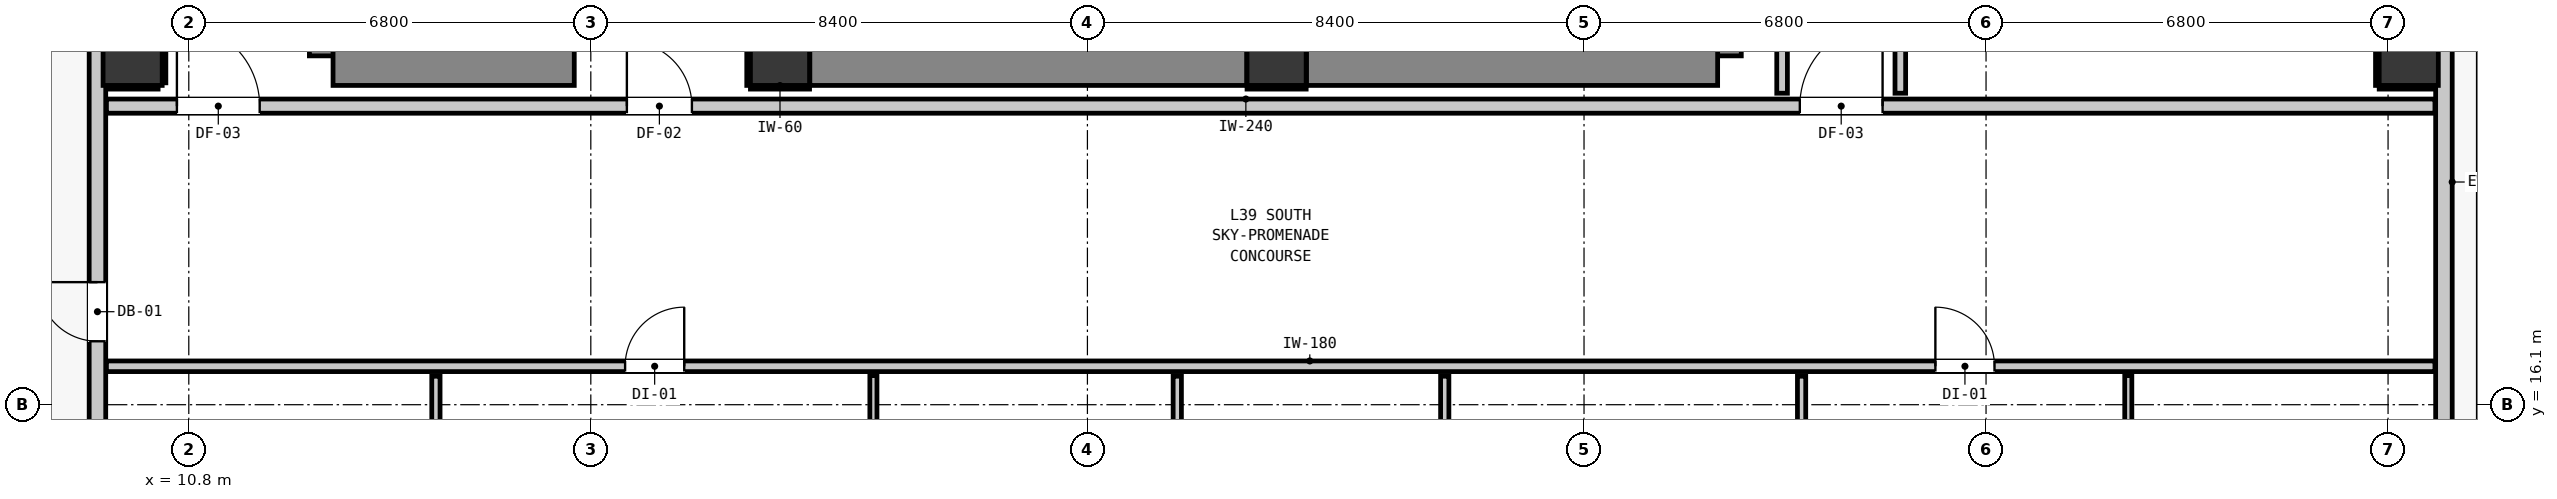
"""IFC4 building model, lengths in metres.
Left out: names, types, materials, properties, quantities, classifications, styles, units other than length and angle.
Written with IfcOpenShell. Run it as: python <this file> out.ifc"""

import sys

from ifc_helpers import new_model, si_unit, direction, frame, frame_2d, origin, origin_2d, place, context, subcontext, project, spatial, rectangle, extrude, element, fill, save


model = new_model("IFC4")
c1 = context("Model", 3, precision=1e-05, world=origin(), true_north=direction((0.0, 1.0)))
c2 = subcontext(c1, "Body", "Model", "MODEL_VIEW")
j1 = project(units=[si_unit("LENGTHUNIT", "METRE"), si_unit("PLANEANGLEUNIT", "RADIAN")], contexts=[c1])
p1 = place(None, origin())
s1 = spatial("IfcSite", under=j1, at=p1, CompositionType="ELEMENT")
p2 = place(p1, origin())
s2 = spatial("IfcBuilding", under=s1, at=p2, CompositionType="ELEMENT")
p3 = place(p2, frame((0.0, 0.0, 135.96)))
s3 = spatial("IfcBuildingStorey", under=s2, at=p3, CompositionType="ELEMENT", Elevation=135.96)
for number, where, z_axis, x_axis in (
    (1, (20.8, 22.0, 0.0), (0.0, 0.0, 1.0), (1.0, 0.0, 0.0)),
    (2, (29.2, 22.0, 0.0), (0.0, 0.0, 1.0), (1.0, 0.0, 0.0)),
):
    element("IfcColumn", number, at=place(p3, frame(where, z_axis=z_axis, x_axis=x_axis)), inside=s3, PredefinedType="COLUMN", context=c2, shape_type="SweptSolid", body=[
        extrude(rectangle(XDim=1.0, YDim=1.0, at=origin_2d()), origin(), (0.0, 0.0, 1.0), 3.32),
    ])
p4 = place(p3, frame((13.34, 22.0, 0.0), z_axis=(0.0, 0.0, 1.0), x_axis=(0.0, 1.0, 0.0)))
e3 = element("IfcWall", 3, at=p4, inside=s3, PredefinedType="SHEAR", context=c2, shape_type="SweptSolid", body=[
    extrude(rectangle(XDim=8.195, YDim=1.0, at=frame_2d((4.098, 0.0))), origin(), (0.0, 0.0, 1.0), 3.32),
])
p5 = place(p3, frame((13.24, 22.0, 0.0), z_axis=(0.0, 0.0, 1.0), x_axis=(1.0, 0.0, 0.0)))
e4 = element("IfcWall", 4, at=p5, inside=s3, PredefinedType="SHEAR", context=c2, shape_type="SweptSolid", body=[
    extrude(rectangle(XDim=4.08, YDim=1.0, at=frame_2d((2.04, 0.0))), origin(), (0.0, 0.0, 1.0), 3.32),
])
p6 = place(p3, frame((36.56, 22.0, 0.0), z_axis=(0.0, 0.0, 1.0), x_axis=(0.0, 1.0, 0.0)))
e5 = element("IfcWall", 5, at=p6, inside=s3, PredefinedType="SHEAR", context=c2, shape_type="SweptSolid", body=[
    extrude(rectangle(XDim=8.195, YDim=1.0, at=frame_2d((4.098, 0.0))), origin(), (0.0, 0.0, 1.0), 3.32),
])
p7 = place(p3, frame((29.705, 22.0, 0.0), z_axis=(0.0, 0.0, 1.0), x_axis=(1.0, 0.0, 0.0)))
e6 = element("IfcWall", 6, at=p7, inside=s3, PredefinedType="SHEAR", context=c2, shape_type="SweptSolid", body=[
    extrude(rectangle(XDim=6.955, YDim=1.0, at=frame_2d((3.478, 0.0))), origin(), (0.0, 0.0, 1.0), 3.32),
])
p8 = place(p3, frame((21.305, 22.0, 0.0), z_axis=(0.0, 0.0, 1.0), x_axis=(1.0, 0.0, 0.0)))
e7 = element("IfcWall", 7, at=p8, inside=s3, PredefinedType="SHEAR", context=c2, shape_type="SweptSolid", body=[
    extrude(rectangle(XDim=7.39, YDim=1.0, at=frame_2d((3.695, 0.0))), origin(), (0.0, 0.0, 1.0), 3.32),
])
for number, where, z_axis, x_axis in (
    (8, (9.85, 22.0, 0.0), (0.0, 0.0, 1.0), (1.0, 0.0, 0.0)),
    (9, (48.35, 22.0, 0.0), (0.0, 0.0, 1.0), (1.0, 0.0, 0.0)),
):
    element("IfcColumn", number, at=place(p3, frame(where, z_axis=z_axis, x_axis=x_axis)), inside=s3, PredefinedType="COLUMN", context=c2, shape_type="SweptSolid", body=[
        extrude(rectangle(XDim=1.0, YDim=1.0, at=origin_2d()), origin(), (0.0, 0.0, 1.0), 3.32),
    ])
p9 = place(p3, frame((9.255, 11.355, 0.0), z_axis=(0.0, 0.0, 1.0), x_axis=(0.0, 1.0, 0.0)))
e10 = element("IfcWall", 10, at=p9, inside=s3, PredefinedType="STANDARD", context=c2, shape_type="SweptSolid", body=[
    extrude(rectangle(XDim=32.29, YDim=0.28, at=frame_2d((16.145, 0.0))), origin(), (0.0, 0.0, 1.0), 3.08),
])
p10 = place(p9, frame((5.818, 0.0, 0.0)))
e11 = element("IfcOpeningElement", 11, at=p10, cuts=e10, PredefinedType="OPENING", context=c2, shape_type="SweptSolid", body=[
    extrude(rectangle(XDim=1.0, YDim=2.15, at=frame_2d((0.5, 1.075))), frame((0.0, 0.15, 0.0), z_axis=(0.0, -1.0, 0.0), x_axis=(1.0, 0.0, 0.0)), (0.0, 0.0, 1.0), 0.3),
])
p11 = place(p9, frame((0.544, 0.0, 0.85)))
e12 = element("IfcOpeningElement", 12, at=p11, cuts=e10, PredefinedType="OPENING", context=c2, shape_type="SweptSolid", body=[
    extrude(rectangle(XDim=1.05, YDim=1.65, at=frame_2d((0.525, 0.825))), frame((0.0, 0.15, 0.0), z_axis=(0.0, -1.0, 0.0), x_axis=(1.0, 0.0, 0.0)), (0.0, 0.0, 1.0), 0.3),
])
p12 = place(p3, frame((48.945, 43.645, 0.0), z_axis=(0.0, 0.0, 1.0), x_axis=(0.0, -1.0, 0.0)))
e13 = element("IfcWall", 13, at=p12, inside=s3, PredefinedType="STANDARD", context=c2, shape_type="SweptSolid", body=[
    extrude(rectangle(XDim=32.29, YDim=0.28, at=frame_2d((16.145, 0.0))), origin(), (0.0, 0.0, 1.0), 3.08),
])
p13 = place(p12, frame((5.467, 0.0, 0.0)))
e14 = element("IfcOpeningElement", 14, at=p13, cuts=e13, PredefinedType="OPENING", context=c2, shape_type="SweptSolid", body=[
    extrude(rectangle(XDim=1.0, YDim=2.15, at=frame_2d((0.5, 1.075))), frame((0.0, 0.15, 0.0), z_axis=(0.0, -1.0, 0.0), x_axis=(1.0, 0.0, 0.0)), (0.0, 0.0, 1.0), 0.3),
])
p14 = place(p12, frame((30.696, 0.0, 0.85)))
e15 = element("IfcOpeningElement", 15, at=p14, cuts=e13, PredefinedType="OPENING", context=c2, shape_type="SweptSolid", body=[
    extrude(rectangle(XDim=1.05, YDim=1.65, at=frame_2d((0.525, 0.825))), frame((0.0, 0.15, 0.0), z_axis=(0.0, -1.0, 0.0), x_axis=(1.0, 0.0, 0.0)), (0.0, 0.0, 1.0), 0.3),
])
p15 = place(p12, frame((14.461, 0.0, 0.85)))
e16 = element("IfcOpeningElement", 16, at=p15, cuts=e13, PredefinedType="OPENING", context=c2, shape_type="SweptSolid", body=[
    extrude(rectangle(XDim=2.4, YDim=1.95, at=frame_2d((1.2, 0.975))), frame((0.0, 0.15, 0.0), z_axis=(0.0, -1.0, 0.0), x_axis=(1.0, 0.0, 0.0)), (0.0, 0.0, 1.0), 0.3),
])
p16 = place(p12, frame((7.106, 0.0, 0.85)))
e17 = element("IfcOpeningElement", 17, at=p16, cuts=e13, PredefinedType="OPENING", context=c2, shape_type="SweptSolid", body=[
    extrude(rectangle(XDim=1.05, YDim=1.65, at=frame_2d((0.525, 0.825))), frame((0.0, 0.15, 0.0), z_axis=(0.0, -1.0, 0.0), x_axis=(1.0, 0.0, 0.0)), (0.0, 0.0, 1.0), 0.3),
])
p17 = place(p3, frame((9.407, 21.15, 0.0), z_axis=(0.0, 0.0, 1.0), x_axis=(1.0, 0.0, 0.0)))
e18 = element("IfcWall", 18, at=p17, inside=s3, PredefinedType="PARTITIONING", context=c2, shape_type="SweptSolid", body=[
    extrude(rectangle(XDim=39.386, YDim=0.24, at=frame_2d((19.693, 0.0))), origin(), (0.0, 0.0, 1.0), 3.08),
])
p18 = place(p17, frame((8.803, 0.0, 0.0)))
e19 = element("IfcOpeningElement", 19, at=p18, cuts=e18, PredefinedType="OPENING", context=c2, shape_type="SweptSolid", body=[
    extrude(rectangle(XDim=1.1, YDim=2.15, at=frame_2d((0.55, 1.075))), frame((0.0, 0.13, 0.0), z_axis=(0.0, -1.0, 0.0), x_axis=(1.0, 0.0, 0.0)), (0.0, 0.0, 1.0), 0.26),
])
p19 = place(p17, frame((1.192, 0.0, 0.0)))
e20 = element("IfcOpeningElement", 20, at=p19, cuts=e18, PredefinedType="OPENING", context=c2, shape_type="SweptSolid", body=[
    extrude(rectangle(XDim=1.4, YDim=2.15, at=frame_2d((0.7, 1.075))), frame((0.0, 0.13, 0.0), z_axis=(0.0, -1.0, 0.0), x_axis=(1.0, 0.0, 0.0)), (0.0, 0.0, 1.0), 0.26),
])
p20 = place(p17, frame((28.643, 0.0, 0.0)))
e21 = element("IfcOpeningElement", 21, at=p20, cuts=e18, PredefinedType="OPENING", context=c2, shape_type="SweptSolid", body=[
    extrude(rectangle(XDim=1.4, YDim=2.15, at=frame_2d((0.7, 1.075))), frame((0.0, 0.13, 0.0), z_axis=(0.0, -1.0, 0.0), x_axis=(1.0, 0.0, 0.0)), (0.0, 0.0, 1.0), 0.26),
])
p21 = place(p3, frame((9.407, 16.75, 0.0), z_axis=(0.0, 0.0, 1.0), x_axis=(1.0, 0.0, 0.0)))
e22 = element("IfcWall", 22, at=p21, inside=s3, PredefinedType="PARTITIONING", context=c2, shape_type="SweptSolid", body=[
    extrude(rectangle(XDim=39.386, YDim=0.18, at=frame_2d((19.693, 0.0))), origin(), (0.0, 0.0, 1.0), 3.08),
])
p22 = place(p21, frame((8.773, 0.0, 0.0)))
e23 = element("IfcOpeningElement", 23, at=p22, cuts=e22, PredefinedType="OPENING", context=c2, shape_type="SweptSolid", body=[
    extrude(rectangle(XDim=1.0, YDim=2.15, at=frame_2d((0.5, 1.075))), frame((0.0, 0.1, 0.0), z_axis=(0.0, -1.0, 0.0), x_axis=(1.0, 0.0, 0.0)), (0.0, 0.0, 1.0), 0.2),
])
p23 = place(p21, frame((30.936, 0.0, 0.0)))
e24 = element("IfcOpeningElement", 24, at=p23, cuts=e22, PredefinedType="OPENING", context=c2, shape_type="SweptSolid", body=[
    extrude(rectangle(XDim=1.0, YDim=2.15, at=frame_2d((0.5, 1.075))), frame((0.0, 0.1, 0.0), z_axis=(0.0, -1.0, 0.0), x_axis=(1.0, 0.0, 0.0)), (0.0, 0.0, 1.0), 0.2),
])
p24 = place(p3, frame((37.75, 21.368, 0.0), z_axis=(0.0, 0.0, 1.0), x_axis=(0.0, 1.0, 0.0)))
e25 = element("IfcWall", 25, at=p24, inside=s3, PredefinedType="PARTITIONING", context=c2, shape_type="SweptSolid", body=[
    extrude(rectangle(XDim=18.694, YDim=0.18, at=frame_2d((9.347, 0.0))), origin(), (0.0, 0.0, 1.0), 3.08),
])
p25 = place(p3, frame((39.75, 21.368, 0.0), z_axis=(0.0, 0.0, 1.0), x_axis=(0.0, 1.0, 0.0)))
e26 = element("IfcWall", 26, at=p25, inside=s3, PredefinedType="PARTITIONING", context=c2, shape_type="SweptSolid", body=[
    extrude(rectangle(XDim=3.964, YDim=0.18, at=frame_2d((1.982, 0.0))), origin(), (0.0, 0.0, 1.0), 3.08),
])
p26 = place(p3, frame((14.98, 13.652, 0.0), z_axis=(0.0, 0.0, 1.0), x_axis=(0.0, 1.0, 0.0)))
e27 = element("IfcWall", 27, at=p26, inside=s3, PredefinedType="PARTITIONING", context=c2, shape_type="SweptSolid", body=[
    extrude(rectangle(XDim=2.93, YDim=0.14, at=frame_2d((1.465, 0.0))), origin(), (0.0, 0.0, 1.0), 3.08),
])
p27 = place(p26, frame((1.032, 0.0, 0.0)))
e28 = element("IfcOpeningElement", 28, at=p27, cuts=e27, PredefinedType="OPENING", context=c2, shape_type="SweptSolid", body=[
    extrude(rectangle(XDim=0.86, YDim=2.02, at=frame_2d((0.43, 1.01))), frame((0.0, 0.08, 0.0), z_axis=(0.0, -1.0, 0.0), x_axis=(1.0, 0.0, 0.0)), (0.0, 0.0, 1.0), 0.16),
])
p28 = place(p3, frame((27.52, 13.652, 0.0), z_axis=(0.0, 0.0, 1.0), x_axis=(0.0, 1.0, 0.0)))
e29 = element("IfcWall", 29, at=p28, inside=s3, PredefinedType="PARTITIONING", context=c2, shape_type="SweptSolid", body=[
    extrude(rectangle(XDim=2.93, YDim=0.14, at=frame_2d((1.465, 0.0))), origin(), (0.0, 0.0, 1.0), 3.08),
])
p29 = place(p28, frame((1.025, 0.0, 0.0)))
e30 = element("IfcOpeningElement", 30, at=p29, cuts=e29, PredefinedType="OPENING", context=c2, shape_type="SweptSolid", body=[
    extrude(rectangle(XDim=0.9, YDim=2.1, at=frame_2d((0.45, 1.05))), frame((0.0, 0.08, 0.0), z_axis=(0.0, -1.0, 0.0), x_axis=(1.0, 0.0, 0.0)), (0.0, 0.0, 1.0), 0.16),
])
p30 = place(p3, frame((32.044, 13.652, 0.0), z_axis=(0.0, 0.0, 1.0), x_axis=(0.0, 1.0, 0.0)))
e31 = element("IfcWall", 31, at=p30, inside=s3, PredefinedType="PARTITIONING", context=c2, shape_type="SweptSolid", body=[
    extrude(rectangle(XDim=2.93, YDim=0.14, at=frame_2d((1.465, 0.0))), origin(), (0.0, 0.0, 1.0), 3.08),
])
p31 = place(p3, frame((38.08, 13.652, 0.0), z_axis=(0.0, 0.0, 1.0), x_axis=(0.0, 1.0, 0.0)))
e32 = element("IfcWall", 32, at=p31, inside=s3, PredefinedType="PARTITIONING", context=c2, shape_type="SweptSolid", body=[
    extrude(rectangle(XDim=2.93, YDim=0.14, at=frame_2d((1.465, 0.0))), origin(), (0.0, 0.0, 1.0), 3.08),
])
p32 = place(p31, frame((1.032, 0.0, 0.0)))
e33 = element("IfcOpeningElement", 33, at=p32, cuts=e32, PredefinedType="OPENING", context=c2, shape_type="SweptSolid", body=[
    extrude(rectangle(XDim=0.86, YDim=2.02, at=frame_2d((0.43, 1.01))), frame((0.0, 0.08, 0.0), z_axis=(0.0, -1.0, 0.0), x_axis=(1.0, 0.0, 0.0)), (0.0, 0.0, 1.0), 0.16),
])
p33 = place(p3, frame((22.38, 13.642, 0.0), z_axis=(0.0, 0.0, 1.0), x_axis=(0.0, 1.0, 0.0)))
e34 = element("IfcWall", 34, at=p33, inside=s3, PredefinedType="PARTITIONING", context=c2, shape_type="SweptSolid", body=[
    extrude(rectangle(XDim=2.95, YDim=0.12, at=frame_2d((1.475, 0.0))), origin(), (0.0, 0.0, 1.0), 3.08),
])
p34 = place(p33, frame((1.022, 0.0, 0.0)))
e35 = element("IfcOpeningElement", 35, at=p34, cuts=e34, PredefinedType="OPENING", context=c2, shape_type="SweptSolid", body=[
    extrude(rectangle(XDim=0.9, YDim=2.1, at=frame_2d((0.45, 1.05))), frame((0.0, 0.07, 0.0), z_axis=(0.0, -1.0, 0.0), x_axis=(1.0, 0.0, 0.0)), (0.0, 0.0, 1.0), 0.14),
])
p35 = place(p3, frame((43.606, 13.642, 0.0), z_axis=(0.0, 0.0, 1.0), x_axis=(0.0, 1.0, 0.0)))
e36 = element("IfcWall", 36, at=p35, inside=s3, PredefinedType="PARTITIONING", context=c2, shape_type="SweptSolid", body=[
    extrude(rectangle(XDim=2.95, YDim=0.12, at=frame_2d((1.475, 0.0))), origin(), (0.0, 0.0, 1.0), 3.08),
])
p36 = place(p35, frame((1.022, 0.0, 0.0)))
e37 = element("IfcOpeningElement", 37, at=p36, cuts=e36, PredefinedType="OPENING", context=c2, shape_type="SweptSolid", body=[
    extrude(rectangle(XDim=0.9, YDim=2.1, at=frame_2d((0.45, 1.05))), frame((0.0, 0.07, 0.0), z_axis=(0.0, -1.0, 0.0), x_axis=(1.0, 0.0, 0.0)), (0.0, 0.0, 1.0), 0.14),
])
for number, where, z_axis, x_axis in (
    (38, (20.3, 21.468, 0.0), (0.0, 0.0, 1.0), (1.0, 0.0, 0.0)),
    (39, (20.268, 21.5, 0.0), (0.0, 0.0, 1.0), (0.0, 1.0, 0.0)),
    (40, (28.7, 21.468, 0.0), (0.0, 0.0, 1.0), (1.0, 0.0, 0.0)),
):
    element("IfcWall", number, at=place(p3, frame(where, z_axis=z_axis, x_axis=x_axis)), inside=s3, PredefinedType="PARTITIONING", context=c2, shape_type="SweptSolid", body=[
        extrude(rectangle(XDim=1.0, YDim=0.06, at=frame_2d((0.5, 0.0))), origin(), (0.0, 0.0, 1.0), 1.45),
    ])
p37 = place(p3, frame((9.41, 21.468, 0.0), z_axis=(0.0, 0.0, 1.0), x_axis=(1.0, 0.0, 0.0)))
e41 = element("IfcWall", 41, at=p37, inside=s3, PredefinedType="PARTITIONING", context=c2, shape_type="SweptSolid", body=[
    extrude(rectangle(XDim=0.871, YDim=0.06, at=frame_2d((0.436, 0.0))), origin(), (0.0, 0.0, 1.0), 1.45),
])
p38 = place(p3, frame((10.382, 21.544, 0.0), z_axis=(0.0, 0.0, 1.0), x_axis=(0.0, 1.0, 0.0)))
e42 = element("IfcWall", 42, at=p38, inside=s3, PredefinedType="PARTITIONING", context=c2, shape_type="SweptSolid", body=[
    extrude(rectangle(XDim=0.956, YDim=0.06, at=frame_2d((0.478, 0.0))), origin(), (0.0, 0.0, 1.0), 1.45),
])
p39 = place(p3, frame((47.85, 21.468, 0.0), z_axis=(0.0, 0.0, 1.0), x_axis=(1.0, 0.0, 0.0)))
e43 = element("IfcWall", 43, at=p39, inside=s3, PredefinedType="PARTITIONING", context=c2, shape_type="SweptSolid", body=[
    extrude(rectangle(XDim=0.94, YDim=0.06, at=frame_2d((0.47, 0.0))), origin(), (0.0, 0.0, 1.0), 1.45),
])
p40 = place(p3, frame((47.818, 21.5, 0.0), z_axis=(0.0, 0.0, 1.0), x_axis=(0.0, 1.0, 0.0)))
e44 = element("IfcWall", 44, at=p40, inside=s3, PredefinedType="PARTITIONING", context=c2, shape_type="SweptSolid", body=[
    extrude(rectangle(XDim=1.0, YDim=0.06, at=frame_2d((0.5, 0.0))), origin(), (0.0, 0.0, 1.0), 1.45),
])
p41 = place(p10, origin())
e45 = element("IfcDoor", 45, at=p41, inside=s3, OperationType="SINGLE_SWING_RIGHT", PredefinedType="DOOR", context=c2, shape_type="SweptSolid", body=[
    extrude(rectangle(XDim=1.0, YDim=2.15, at=frame_2d((0.5, 1.075))), frame((0.0, 0.025, 0.0), z_axis=(0.0, -1.0, 0.0), x_axis=(1.0, 0.0, 0.0)), (0.0, 0.0, 1.0), 0.05),
])
fill(e11, e45)
p42 = place(p18, origin())
e46 = element("IfcDoor", 46, at=p42, inside=s3, OperationType="SINGLE_SWING_LEFT", PredefinedType="DOOR", context=c2, shape_type="SweptSolid", body=[
    extrude(rectangle(XDim=1.1, YDim=2.15, at=frame_2d((0.55, 1.075))), frame((0.0, 0.025, 0.0), z_axis=(0.0, -1.0, 0.0), x_axis=(1.0, 0.0, 0.0)), (0.0, 0.0, 1.0), 0.05),
])
fill(e19, e46)
p43 = place(p19, origin())
e47 = element("IfcDoor", 47, at=p43, inside=s3, OperationType="SINGLE_SWING_LEFT", PredefinedType="DOOR", context=c2, shape_type="SweptSolid", body=[
    extrude(rectangle(XDim=1.4, YDim=2.15, at=frame_2d((0.7, 1.075))), frame((0.0, 0.025, 0.0), z_axis=(0.0, -1.0, 0.0), x_axis=(1.0, 0.0, 0.0)), (0.0, 0.0, 1.0), 0.05),
])
fill(e20, e47)
p44 = place(p20, origin())
e48 = element("IfcDoor", 48, at=p44, inside=s3, OperationType="SINGLE_SWING_RIGHT", PredefinedType="DOOR", context=c2, shape_type="SweptSolid", body=[
    extrude(rectangle(XDim=1.4, YDim=2.15, at=frame_2d((0.7, 1.075))), frame((0.0, 0.025, 0.0), z_axis=(0.0, -1.0, 0.0), x_axis=(1.0, 0.0, 0.0)), (0.0, 0.0, 1.0), 0.05),
])
fill(e21, e48)
p45 = place(p22, origin())
e49 = element("IfcDoor", 49, at=p45, inside=s3, OperationType="SINGLE_SWING_RIGHT", PredefinedType="DOOR", context=c2, shape_type="SweptSolid", body=[
    extrude(rectangle(XDim=1.0, YDim=2.15, at=frame_2d((0.5, 1.075))), frame((0.0, 0.025, 0.0), z_axis=(0.0, -1.0, 0.0), x_axis=(1.0, 0.0, 0.0)), (0.0, 0.0, 1.0), 0.05),
])
fill(e23, e49)
p46 = place(p23, origin())
e50 = element("IfcDoor", 50, at=p46, inside=s3, OperationType="SINGLE_SWING_LEFT", PredefinedType="DOOR", context=c2, shape_type="SweptSolid", body=[
    extrude(rectangle(XDim=1.0, YDim=2.15, at=frame_2d((0.5, 1.075))), frame((0.0, 0.025, 0.0), z_axis=(0.0, -1.0, 0.0), x_axis=(1.0, 0.0, 0.0)), (0.0, 0.0, 1.0), 0.05),
])
fill(e24, e50)
save(model, sys.argv[1])
